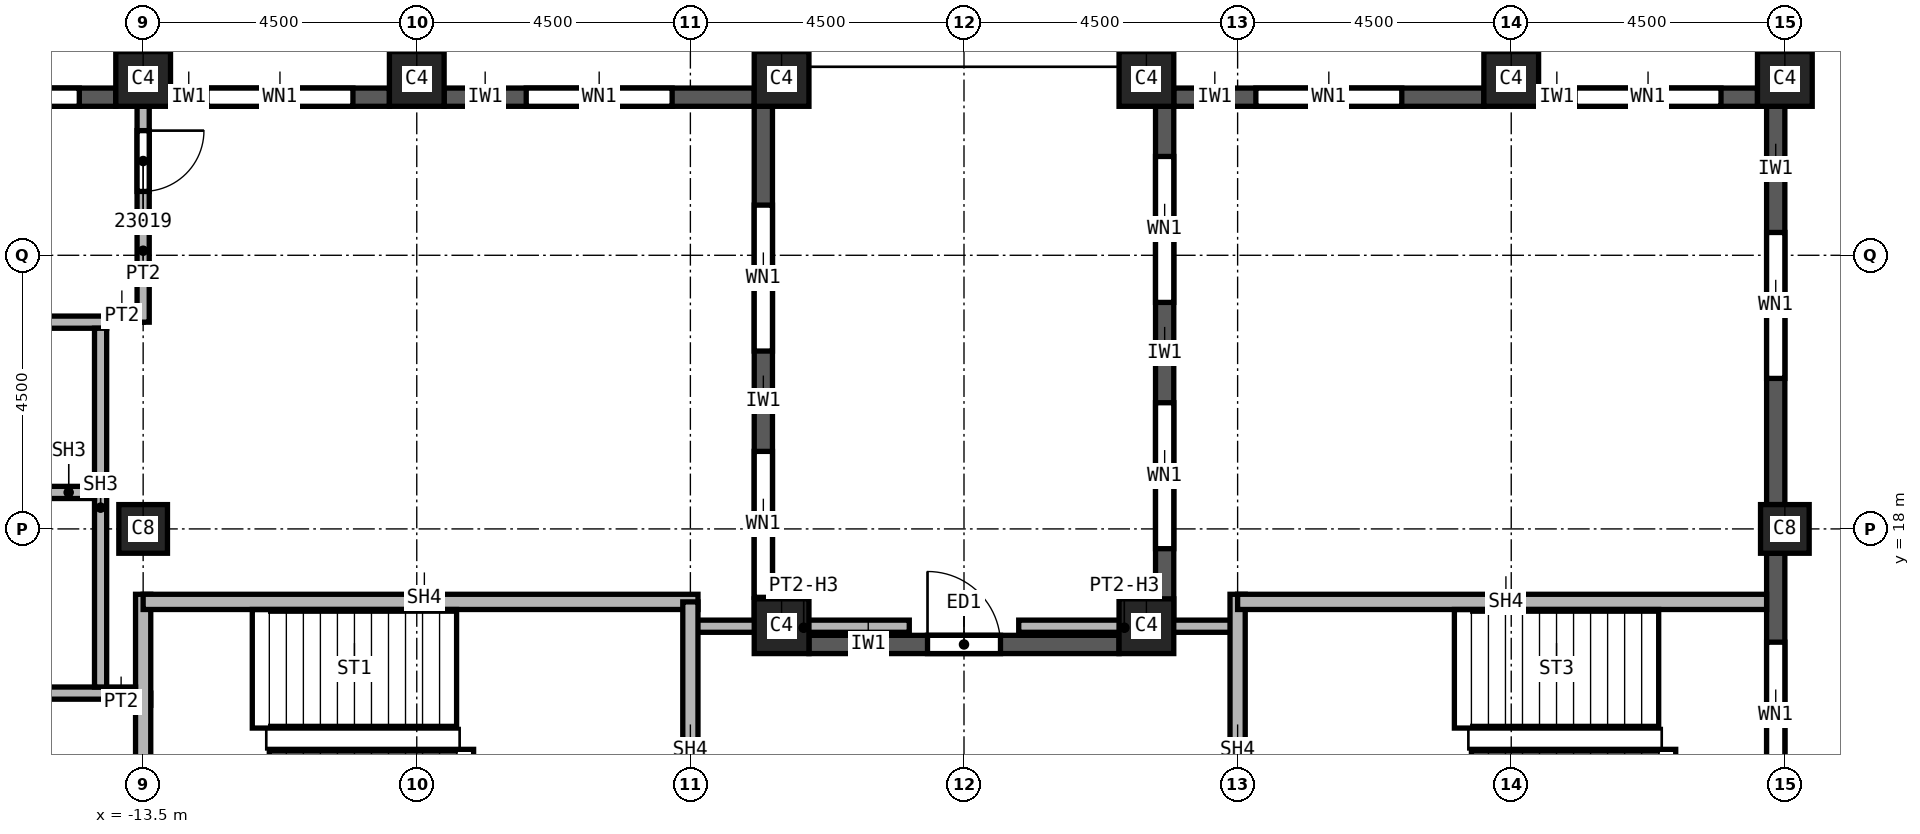
"""IFC4 building model, lengths in metres.
Left out: names, types, materials, properties, quantities, classifications, styles, units other than length and angle.
Written with IfcOpenShell. Run it as: python <this file> out.ifc"""

import sys

from ifc_helpers import new_model, si_unit, direction, frame, frame_2d, origin, origin_2d, place, context, subcontext, project, spatial, rectangle, extrude, element, fill, save


model = new_model("IFC4")
c1 = context("Model", 3, precision=1e-05, world=origin(), true_north=direction((0.0, 1.0)))
c2 = subcontext(c1, "Body", "Model", "MODEL_VIEW")
j1 = project(units=[si_unit("LENGTHUNIT", "METRE"), si_unit("PLANEANGLEUNIT", "RADIAN")], contexts=[c1])
p1 = place(None, origin())
s1 = spatial("IfcSite", under=j1, at=p1, CompositionType="ELEMENT")
p2 = place(p1, origin())
s2 = spatial("IfcBuilding", under=s1, at=p2, CompositionType="ELEMENT")
p3 = place(p2, frame((0.0, 0.0, 326.0)))
s3 = spatial("IfcBuildingStorey", under=s2, at=p3, CompositionType="ELEMENT", Elevation=326.0)
for number, where, z_axis, x_axis in (
    (1, (13.5, 18.0, 0.0), (0.0, 0.0, 1.0), (1.0, 0.0, 0.0)),
    (2, (-13.5, 18.0, 0.0), (0.0, 0.0, 1.0), (1.0, 0.0, 0.0)),
):
    element("IfcColumn", number, at=place(p3, frame(where, z_axis=z_axis, x_axis=x_axis)), inside=s3, PredefinedType="COLUMN", context=c2, shape_type="SweptSolid", body=[
        extrude(rectangle(XDim=0.8, YDim=0.8, at=origin_2d()), origin(), (0.0, 0.0, 1.0), 3.74),
    ])
for number, where, z_axis, x_axis in (
    (3, (3.0, 25.4, 0.0), (0.0, 0.0, 1.0), (1.0, 0.0, 0.0)),
    (4, (9.0, 25.4, 0.0), (0.0, 0.0, 1.0), (1.0, 0.0, 0.0)),
    (5, (13.5, 25.4, 0.0), (0.0, 0.0, 1.0), (1.0, 0.0, 0.0)),
    (6, (-3.0, 25.4, 0.0), (0.0, 0.0, 1.0), (1.0, 0.0, 0.0)),
    (7, (-9.0, 25.4, 0.0), (0.0, 0.0, 1.0), (1.0, 0.0, 0.0)),
    (8, (-13.5, 25.4, 0.0), (0.0, 0.0, 1.0), (1.0, 0.0, 0.0)),
    (9, (3.0, 16.4, 0.0), (0.0, 0.0, 1.0), (1.0, 0.0, 0.0)),
    (10, (-3.0, 16.4, 0.0), (0.0, 0.0, 1.0), (1.0, 0.0, 0.0)),
):
    element("IfcColumn", number, at=place(p3, frame(where, z_axis=z_axis, x_axis=x_axis)), inside=s3, PredefinedType="COLUMN", context=c2, shape_type="SweptSolid", body=[
        extrude(rectangle(XDim=0.9, YDim=0.9, at=origin_2d()), origin(), (0.0, 0.0, 1.0), 3.74),
    ])
p4 = place(p3, frame((13.05, 25.1, 0.0), z_axis=(0.0, 0.0, 1.0), x_axis=(-1.0, 0.0, 0.0)))
e11 = element("IfcWall", 11, at=p4, inside=s3, PredefinedType="SOLIDWALL", context=c2, shape_type="SweptSolid", body=[
    extrude(rectangle(XDim=3.6, YDim=0.3, at=frame_2d((1.8, 0.0))), origin(), (0.0, 0.0, 1.0), 3.14),
])
p5 = place(p4, frame((0.6, 0.0, 0.8)))
e12 = element("IfcOpeningElement", 12, at=p5, cuts=e11, PredefinedType="OPENING", context=c2, shape_type="SweptSolid", body=[
    extrude(rectangle(XDim=2.4, YDim=1.95, at=frame_2d((1.2, 0.975))), frame((0.0, 0.15, 0.0), z_axis=(0.0, -1.0, 0.0), x_axis=(1.0, 0.0, 0.0)), (0.0, 0.0, 1.0), 0.3),
])
p6 = place(p3, frame((8.55, 25.1, 0.0), z_axis=(0.0, 0.0, 1.0), x_axis=(-1.0, 0.0, 0.0)))
e13 = element("IfcWall", 13, at=p6, inside=s3, PredefinedType="SOLIDWALL", context=c2, shape_type="SweptSolid", body=[
    extrude(rectangle(XDim=5.1, YDim=0.3, at=frame_2d((2.55, 0.0))), origin(), (0.0, 0.0, 1.0), 3.14),
])
p7 = place(p6, frame((1.35, 0.0, 0.8)))
e14 = element("IfcOpeningElement", 14, at=p7, cuts=e13, PredefinedType="OPENING", context=c2, shape_type="SweptSolid", body=[
    extrude(rectangle(XDim=2.4, YDim=1.95, at=frame_2d((1.2, 0.975))), frame((0.0, 0.15, 0.0), z_axis=(0.0, -1.0, 0.0), x_axis=(1.0, 0.0, 0.0)), (0.0, 0.0, 1.0), 0.3),
])
p8 = place(p3, frame((3.3, 24.95, 0.0), z_axis=(0.0, 0.0, 1.0), x_axis=(0.0, -1.0, 0.0)))
e15 = element("IfcWall", 15, at=p8, inside=s3, PredefinedType="SOLIDWALL", context=c2, shape_type="SweptSolid", body=[
    extrude(rectangle(XDim=8.5, YDim=0.3, at=frame_2d((4.25, 0.0))), origin(), (0.0, 0.0, 1.0), 3.14),
])
p9 = place(p8, frame((0.825, 0.0, 0.8)))
e16 = element("IfcOpeningElement", 16, at=p9, cuts=e15, PredefinedType="OPENING", context=c2, shape_type="SweptSolid", body=[
    extrude(rectangle(XDim=2.4, YDim=1.95, at=frame_2d((1.2, 0.975))), frame((0.0, 0.15, 0.0), z_axis=(0.0, -1.0, 0.0), x_axis=(1.0, 0.0, 0.0)), (0.0, 0.0, 1.0), 0.3),
])
p10 = place(p8, frame((4.875, 0.0, 0.8)))
e17 = element("IfcOpeningElement", 17, at=p10, cuts=e15, PredefinedType="OPENING", context=c2, shape_type="SweptSolid", body=[
    extrude(rectangle(XDim=2.4, YDim=1.95, at=frame_2d((1.2, 0.975))), frame((0.0, 0.15, 0.0), z_axis=(0.0, -1.0, 0.0), x_axis=(1.0, 0.0, 0.0)), (0.0, 0.0, 1.0), 0.3),
])
p11 = place(p3, frame((-2.55, 16.1, 0.0), z_axis=(0.0, 0.0, 1.0), x_axis=(1.0, 0.0, 0.0)))
e18 = element("IfcWall", 18, at=p11, inside=s3, PredefinedType="SOLIDWALL", context=c2, shape_type="SweptSolid", body=[
    extrude(rectangle(XDim=5.1, YDim=0.3, at=frame_2d((2.55, 0.0))), origin(), (0.0, 0.0, 1.0), 3.14),
])
p12 = place(p11, frame((1.95, 0.0, 0.0)))
e19 = element("IfcOpeningElement", 19, at=p12, cuts=e18, PredefinedType="OPENING", context=c2, shape_type="SweptSolid", body=[
    extrude(rectangle(XDim=1.2, YDim=2.4, at=frame_2d((0.6, 1.2))), frame((0.0, 0.15, 0.0), z_axis=(0.0, -1.0, 0.0), x_axis=(1.0, 0.0, 0.0)), (0.0, 0.0, 1.0), 0.3),
])
p13 = place(p3, frame((-3.3, 16.45, 0.0), z_axis=(0.0, 0.0, 1.0), x_axis=(0.0, 1.0, 0.0)))
e20 = element("IfcWall", 20, at=p13, inside=s3, PredefinedType="SOLIDWALL", context=c2, shape_type="SweptSolid", body=[
    extrude(rectangle(XDim=8.5, YDim=0.3, at=frame_2d((4.25, 0.0))), origin(), (0.0, 0.0, 1.0), 3.14),
])
p14 = place(p13, frame((0.425, 0.0, 0.8)))
e21 = element("IfcOpeningElement", 21, at=p14, cuts=e20, PredefinedType="OPENING", context=c2, shape_type="SweptSolid", body=[
    extrude(rectangle(XDim=2.4, YDim=1.95, at=frame_2d((1.2, 0.975))), frame((0.0, 0.15, 0.0), z_axis=(0.0, -1.0, 0.0), x_axis=(1.0, 0.0, 0.0)), (0.0, 0.0, 1.0), 0.3),
])
p15 = place(p13, frame((4.475, 0.0, 0.8)))
e22 = element("IfcOpeningElement", 22, at=p15, cuts=e20, PredefinedType="OPENING", context=c2, shape_type="SweptSolid", body=[
    extrude(rectangle(XDim=2.4, YDim=1.95, at=frame_2d((1.2, 0.975))), frame((0.0, 0.15, 0.0), z_axis=(0.0, -1.0, 0.0), x_axis=(1.0, 0.0, 0.0)), (0.0, 0.0, 1.0), 0.3),
])
p16 = place(p3, frame((-3.45, 25.1, 0.0), z_axis=(0.0, 0.0, 1.0), x_axis=(-1.0, 0.0, 0.0)))
e23 = element("IfcWall", 23, at=p16, inside=s3, PredefinedType="SOLIDWALL", context=c2, shape_type="SweptSolid", body=[
    extrude(rectangle(XDim=5.1, YDim=0.3, at=frame_2d((2.55, 0.0))), origin(), (0.0, 0.0, 1.0), 3.14),
])
p17 = place(p16, frame((1.35, 0.0, 0.8)))
e24 = element("IfcOpeningElement", 24, at=p17, cuts=e23, PredefinedType="OPENING", context=c2, shape_type="SweptSolid", body=[
    extrude(rectangle(XDim=2.4, YDim=1.95, at=frame_2d((1.2, 0.975))), frame((0.0, 0.15, 0.0), z_axis=(0.0, -1.0, 0.0), x_axis=(1.0, 0.0, 0.0)), (0.0, 0.0, 1.0), 0.3),
])
p18 = place(p3, frame((-9.45, 25.1, 0.0), z_axis=(0.0, 0.0, 1.0), x_axis=(-1.0, 0.0, 0.0)))
e25 = element("IfcWall", 25, at=p18, inside=s3, PredefinedType="SOLIDWALL", context=c2, shape_type="SweptSolid", body=[
    extrude(rectangle(XDim=3.6, YDim=0.3, at=frame_2d((1.8, 0.0))), origin(), (0.0, 0.0, 1.0), 3.14),
])
p19 = place(p18, frame((0.6, 0.0, 0.8)))
e26 = element("IfcOpeningElement", 26, at=p19, cuts=e25, PredefinedType="OPENING", context=c2, shape_type="SweptSolid", body=[
    extrude(rectangle(XDim=2.4, YDim=1.95, at=frame_2d((1.2, 0.975))), frame((0.0, 0.15, 0.0), z_axis=(0.0, -1.0, 0.0), x_axis=(1.0, 0.0, 0.0)), (0.0, 0.0, 1.0), 0.3),
])
p20 = place(p3, frame((-13.95, 25.1, 0.0), z_axis=(0.0, 0.0, 1.0), x_axis=(-1.0, 0.0, 0.0)))
e27 = element("IfcWall", 27, at=p20, inside=s3, PredefinedType="SOLIDWALL", context=c2, shape_type="SweptSolid", body=[
    extrude(rectangle(XDim=3.6, YDim=0.3, at=frame_2d((1.8, 0.0))), origin(), (0.0, 0.0, 1.0), 3.14),
])
p21 = place(p20, frame((0.6, 0.0, 0.8)))
e28 = element("IfcOpeningElement", 28, at=p21, cuts=e27, PredefinedType="OPENING", context=c2, shape_type="SweptSolid", body=[
    extrude(rectangle(XDim=2.4, YDim=1.95, at=frame_2d((1.2, 0.975))), frame((0.0, 0.15, 0.0), z_axis=(0.0, -1.0, 0.0), x_axis=(1.0, 0.0, 0.0)), (0.0, 0.0, 1.0), 0.3),
])
p22 = place(p3, frame((13.35, 9.05, 0.0), z_axis=(0.0, 0.0, 1.0), x_axis=(0.0, 1.0, 0.0)))
e29 = element("IfcWall", 29, at=p22, inside=s3, PredefinedType="SOLIDWALL", context=c2, shape_type="SweptSolid", body=[
    extrude(rectangle(XDim=8.55, YDim=0.3, at=frame_2d((4.275, 0.0))), origin(), (0.0, 0.0, 1.0), 3.14),
])
p23 = place(p22, frame((0.562, 0.0, 0.8)))
e30 = element("IfcOpeningElement", 30, at=p23, cuts=e29, PredefinedType="OPENING", context=c2, shape_type="SweptSolid", body=[
    extrude(rectangle(XDim=2.4, YDim=1.95, at=frame_2d((1.2, 0.975))), frame((0.0, 0.15, 0.0), z_axis=(0.0, -1.0, 0.0), x_axis=(1.0, 0.0, 0.0)), (0.0, 0.0, 1.0), 0.3),
])
p24 = place(p22, frame((4.688, 0.0, 0.8)))
e31 = element("IfcOpeningElement", 31, at=p24, cuts=e29, PredefinedType="OPENING", context=c2, shape_type="SweptSolid", body=[
    extrude(rectangle(XDim=2.4, YDim=1.95, at=frame_2d((1.2, 0.975))), frame((0.0, 0.15, 0.0), z_axis=(0.0, -1.0, 0.0), x_axis=(1.0, 0.0, 0.0)), (0.0, 0.0, 1.0), 0.3),
])
p25 = place(p3, frame((13.35, 18.4, 0.0), z_axis=(0.0, 0.0, 1.0), x_axis=(0.0, 1.0, 0.0)))
e32 = element("IfcWall", 32, at=p25, inside=s3, PredefinedType="SOLIDWALL", context=c2, shape_type="SweptSolid", body=[
    extrude(rectangle(XDim=6.55, YDim=0.3, at=frame_2d((3.275, 0.0))), origin(), (0.0, 0.0, 1.0), 3.14),
])
p26 = place(p25, frame((2.075, 0.0, 0.8)))
e33 = element("IfcOpeningElement", 33, at=p26, cuts=e32, PredefinedType="OPENING", context=c2, shape_type="SweptSolid", body=[
    extrude(rectangle(XDim=2.4, YDim=1.95, at=frame_2d((1.2, 0.975))), frame((0.0, 0.15, 0.0), z_axis=(0.0, -1.0, 0.0), x_axis=(1.0, 0.0, 0.0)), (0.0, 0.0, 1.0), 0.3),
])
p27 = place(p3, frame((-14.1, 15.2, 0.0), z_axis=(0.0, 0.0, 1.0), x_axis=(1.0, 0.0, 0.0)))
e34 = element("IfcWall", 34, at=p27, inside=s3, PredefinedType="PARTITIONING", context=c2, shape_type="SweptSolid", body=[
    extrude(rectangle(XDim=0.725, YDim=0.2, at=frame_2d((0.363, 0.0))), origin(), (0.0, 0.0, 1.0), 3.74),
])
p28 = place(p3, frame((-13.5, 21.5, 0.0), z_axis=(0.0, 0.0, 1.0), x_axis=(-1.0, 0.0, 0.0)))
e35 = element("IfcWall", 35, at=p28, inside=s3, PredefinedType="PARTITIONING", context=c2, shape_type="SweptSolid", body=[
    extrude(rectangle(XDim=0.6, YDim=0.2, at=frame_2d((0.3, 0.0))), origin(), (0.0, 0.0, 1.0), 3.74),
])
p29 = place(p3, frame((-13.5, 24.95, 0.0), z_axis=(0.0, 0.0, 1.0), x_axis=(0.0, -1.0, 0.0)))
e36 = element("IfcWall", 36, at=p29, inside=s3, PredefinedType="PARTITIONING", context=c2, shape_type="SweptSolid", body=[
    extrude(rectangle(XDim=3.55, YDim=0.2, at=frame_2d((1.775, 0.0))), origin(), (0.0, 0.0, 1.0), 3.74),
])
p30 = place(p29, frame((0.4, 0.0, 0.0)))
e37 = element("IfcOpeningElement", 37, at=p30, cuts=e36, PredefinedType="OPENING", context=c2, shape_type="SweptSolid", body=[
    extrude(rectangle(XDim=1.0, YDim=2.1, at=frame_2d((0.5, 1.05))), frame((0.0, 0.1, 0.0), z_axis=(0.0, -1.0, 0.0), x_axis=(1.0, 0.0, 0.0)), (0.0, 0.0, 1.0), 0.2),
])
for number, where, z_axis, x_axis in (
    (38, (-4.5, 16.4, 0.0), (0.0, 0.0, 1.0), (1.0, 0.0, 0.0)),
    (39, (0.9, 16.4, 0.0), (0.0, 0.0, 1.0), (1.0, 0.0, 0.0)),
):
    element("IfcWall", number, at=place(p3, frame(where, z_axis=z_axis, x_axis=x_axis)), inside=s3, PredefinedType="PARTITIONING", context=c2, shape_type="SweptSolid", body=[
        extrude(rectangle(XDim=3.6, YDim=0.2, at=frame_2d((1.8, 0.0))), origin(), (0.0, 0.0, 1.0), 3.204),
    ])
p31 = place(p3, frame((-13.5, 12.175, 0.0), z_axis=(0.0, 0.0, 1.0), x_axis=(0.0, 1.0, 0.0)))
e40 = element("IfcWall", 40, at=p31, inside=s3, PredefinedType="SOLIDWALL", context=c2, shape_type="SweptSolid", body=[
    extrude(rectangle(XDim=4.75, YDim=0.25, at=frame_2d((2.375, 0.0))), origin(), (0.0, 0.0, 1.0), 3.74),
])
p32 = place(p3, frame((-13.5, 16.8, 0.0), z_axis=(0.0, 0.0, 1.0), x_axis=(1.0, 0.0, 0.0)))
e41 = element("IfcWall", 41, at=p32, inside=s3, PredefinedType="SOLIDWALL", context=c2, shape_type="SweptSolid", body=[
    extrude(rectangle(XDim=9.125, YDim=0.25, at=frame_2d((4.562, 0.0))), origin(), (0.0, 0.0, 1.0), 3.74),
])
p33 = place(p3, frame((-4.5, 16.8, 0.0), z_axis=(0.0, 0.0, 1.0), x_axis=(0.0, -1.0, 0.0)))
e42 = element("IfcWall", 42, at=p33, inside=s3, PredefinedType="SOLIDWALL", context=c2, shape_type="SweptSolid", body=[
    extrude(rectangle(XDim=4.5, YDim=0.25, at=frame_2d((2.25, 0.0))), origin(), (0.0, 0.0, 1.0), 3.74),
])
p34 = place(p3, frame((4.5, 12.3, 0.0), z_axis=(0.0, 0.0, 1.0), x_axis=(0.0, 1.0, 0.0)))
e43 = element("IfcWall", 43, at=p34, inside=s3, PredefinedType="SOLIDWALL", context=c2, shape_type="SweptSolid", body=[
    extrude(rectangle(XDim=4.625, YDim=0.25, at=frame_2d((2.312, 0.0))), origin(), (0.0, 0.0, 1.0), 3.74),
])
p35 = place(p3, frame((4.5, 16.8, 0.0), z_axis=(0.0, 0.0, 1.0), x_axis=(1.0, 0.0, 0.0)))
e44 = element("IfcWall", 44, at=p35, inside=s3, PredefinedType="SOLIDWALL", context=c2, shape_type="SweptSolid", body=[
    extrude(rectangle(XDim=8.7, YDim=0.25, at=frame_2d((4.35, 0.0))), origin(), (0.0, 0.0, 1.0), 3.74),
])
p36 = place(p3, frame((-21.9, 15.3, 0.0), z_axis=(0.0, 0.0, 1.0), x_axis=(1.0, 0.0, 0.0)))
e45 = element("IfcWall", 45, at=p36, inside=s3, PredefinedType="SOLIDWALL", context=c2, shape_type="SweptSolid", body=[
    extrude(rectangle(XDim=8.275, YDim=0.2, at=frame_2d((4.137, 0.0))), origin(), (0.0, 0.0, 1.0), 3.74),
])
p37 = place(p36, frame((4.8, 0.0, 0.0)))
e46 = element("IfcOpeningElement", 46, at=p37, cuts=e45, PredefinedType="OPENING", context=c2, shape_type="SweptSolid", body=[
    extrude(rectangle(XDim=1.2, YDim=2.1, at=frame_2d((0.6, 1.05))), frame((0.0, 0.1, 0.0), z_axis=(0.0, -1.0, 0.0), x_axis=(1.0, 0.0, 0.0)), (0.0, 0.0, 1.0), 0.2),
])
p38 = place(p3, frame((-21.9, 21.4, 0.0), z_axis=(0.0, 0.0, 1.0), x_axis=(1.0, 0.0, 0.0)))
e47 = element("IfcWall", 47, at=p38, inside=s3, PredefinedType="SOLIDWALL", context=c2, shape_type="SweptSolid", body=[
    extrude(rectangle(XDim=7.8, YDim=0.2, at=frame_2d((3.9, 0.0))), origin(), (0.0, 0.0, 1.0), 3.74),
])
p39 = place(p38, frame((3.2, 0.0, 0.0)))
e48 = element("IfcOpeningElement", 48, at=p39, cuts=e47, PredefinedType="OPENING", context=c2, shape_type="SweptSolid", body=[
    extrude(rectangle(XDim=1.2, YDim=2.1, at=frame_2d((0.6, 1.05))), frame((0.0, 0.1, 0.0), z_axis=(0.0, -1.0, 0.0), x_axis=(1.0, 0.0, 0.0)), (0.0, 0.0, 1.0), 0.2),
])
p40 = place(p3, frame((-14.2, 15.4, 0.0), z_axis=(0.0, 0.0, 1.0), x_axis=(0.0, 1.0, 0.0)))
e49 = element("IfcWall", 49, at=p40, inside=s3, PredefinedType="SOLIDWALL", context=c2, shape_type="SweptSolid", body=[
    extrude(rectangle(XDim=5.9, YDim=0.2, at=frame_2d((2.95, 0.0))), origin(), (0.0, 0.0, 1.0), 3.74),
])
p41 = place(p3, frame((-17.1, 18.6, 0.0), z_axis=(0.0, 0.0, 1.0), x_axis=(1.0, 0.0, 0.0)))
e50 = element("IfcWall", 50, at=p41, inside=s3, PredefinedType="SOLIDWALL", context=c2, shape_type="SweptSolid", body=[
    extrude(rectangle(XDim=2.8, YDim=0.2, at=frame_2d((1.4, 0.0))), origin(), (0.0, 0.0, 1.0), 3.74),
])
p42 = place(p41, frame((0.85, 0.0, 0.0)))
e51 = element("IfcOpeningElement", 51, at=p42, cuts=e50, PredefinedType="OPENING", context=c2, shape_type="SweptSolid", body=[
    extrude(rectangle(XDim=1.1, YDim=2.1, at=frame_2d((0.55, 1.05))), frame((0.0, 0.1, 0.0), z_axis=(0.0, -1.0, 0.0), x_axis=(1.0, 0.0, 0.0)), (0.0, 0.0, 1.0), 0.2),
])
p43 = place(p5, origin())
e52 = element("IfcWindow", 52, at=p43, inside=s3, PartitioningType="SINGLE_PANEL", PredefinedType="WINDOW", context=c2, shape_type="SweptSolid", body=[
    extrude(rectangle(XDim=2.4, YDim=1.95, at=frame_2d((1.2, 0.975))), frame((0.0, 0.03, 0.0), z_axis=(0.0, -1.0, 0.0), x_axis=(1.0, 0.0, 0.0)), (0.0, 0.0, 1.0), 0.06),
])
fill(e12, e52)
p44 = place(p7, origin())
e53 = element("IfcWindow", 53, at=p44, inside=s3, PartitioningType="SINGLE_PANEL", PredefinedType="WINDOW", context=c2, shape_type="SweptSolid", body=[
    extrude(rectangle(XDim=2.4, YDim=1.95, at=frame_2d((1.2, 0.975))), frame((0.0, 0.03, 0.0), z_axis=(0.0, -1.0, 0.0), x_axis=(1.0, 0.0, 0.0)), (0.0, 0.0, 1.0), 0.06),
])
fill(e14, e53)
p45 = place(p9, origin())
e54 = element("IfcWindow", 54, at=p45, inside=s3, PartitioningType="SINGLE_PANEL", PredefinedType="WINDOW", context=c2, shape_type="SweptSolid", body=[
    extrude(rectangle(XDim=2.4, YDim=1.95, at=frame_2d((1.2, 0.975))), frame((0.0, 0.03, 0.0), z_axis=(0.0, -1.0, 0.0), x_axis=(1.0, 0.0, 0.0)), (0.0, 0.0, 1.0), 0.06),
])
fill(e16, e54)
p46 = place(p10, origin())
e55 = element("IfcWindow", 55, at=p46, inside=s3, PartitioningType="SINGLE_PANEL", PredefinedType="WINDOW", context=c2, shape_type="SweptSolid", body=[
    extrude(rectangle(XDim=2.4, YDim=1.95, at=frame_2d((1.2, 0.975))), frame((0.0, 0.03, 0.0), z_axis=(0.0, -1.0, 0.0), x_axis=(1.0, 0.0, 0.0)), (0.0, 0.0, 1.0), 0.06),
])
fill(e17, e55)
p47 = place(p12, origin())
e56 = element("IfcDoor", 56, at=p47, inside=s3, OperationType="SINGLE_SWING_LEFT", PredefinedType="DOOR", context=c2, shape_type="SweptSolid", body=[
    extrude(rectangle(XDim=1.2, YDim=2.4, at=frame_2d((0.6, 1.2))), frame((0.0, 0.025, 0.0), z_axis=(0.0, -1.0, 0.0), x_axis=(1.0, 0.0, 0.0)), (0.0, 0.0, 1.0), 0.05),
])
fill(e19, e56)
p48 = place(p14, origin())
e57 = element("IfcWindow", 57, at=p48, inside=s3, PartitioningType="SINGLE_PANEL", PredefinedType="WINDOW", context=c2, shape_type="SweptSolid", body=[
    extrude(rectangle(XDim=2.4, YDim=1.95, at=frame_2d((1.2, 0.975))), frame((0.0, 0.03, 0.0), z_axis=(0.0, -1.0, 0.0), x_axis=(1.0, 0.0, 0.0)), (0.0, 0.0, 1.0), 0.06),
])
fill(e21, e57)
p49 = place(p15, origin())
e58 = element("IfcWindow", 58, at=p49, inside=s3, PartitioningType="SINGLE_PANEL", PredefinedType="WINDOW", context=c2, shape_type="SweptSolid", body=[
    extrude(rectangle(XDim=2.4, YDim=1.95, at=frame_2d((1.2, 0.975))), frame((0.0, 0.03, 0.0), z_axis=(0.0, -1.0, 0.0), x_axis=(1.0, 0.0, 0.0)), (0.0, 0.0, 1.0), 0.06),
])
fill(e22, e58)
p50 = place(p17, origin())
e59 = element("IfcWindow", 59, at=p50, inside=s3, PartitioningType="SINGLE_PANEL", PredefinedType="WINDOW", context=c2, shape_type="SweptSolid", body=[
    extrude(rectangle(XDim=2.4, YDim=1.95, at=frame_2d((1.2, 0.975))), frame((0.0, 0.03, 0.0), z_axis=(0.0, -1.0, 0.0), x_axis=(1.0, 0.0, 0.0)), (0.0, 0.0, 1.0), 0.06),
])
fill(e24, e59)
p51 = place(p19, origin())
e60 = element("IfcWindow", 60, at=p51, inside=s3, PartitioningType="SINGLE_PANEL", PredefinedType="WINDOW", context=c2, shape_type="SweptSolid", body=[
    extrude(rectangle(XDim=2.4, YDim=1.95, at=frame_2d((1.2, 0.975))), frame((0.0, 0.03, 0.0), z_axis=(0.0, -1.0, 0.0), x_axis=(1.0, 0.0, 0.0)), (0.0, 0.0, 1.0), 0.06),
])
fill(e26, e60)
p52 = place(p21, origin())
e61 = element("IfcWindow", 61, at=p52, inside=s3, PartitioningType="SINGLE_PANEL", PredefinedType="WINDOW", context=c2, shape_type="SweptSolid", body=[
    extrude(rectangle(XDim=2.4, YDim=1.95, at=frame_2d((1.2, 0.975))), frame((0.0, 0.03, 0.0), z_axis=(0.0, -1.0, 0.0), x_axis=(1.0, 0.0, 0.0)), (0.0, 0.0, 1.0), 0.06),
])
fill(e28, e61)
p53 = place(p24, origin())
e62 = element("IfcWindow", 62, at=p53, inside=s3, PartitioningType="SINGLE_PANEL", PredefinedType="WINDOW", context=c2, shape_type="SweptSolid", body=[
    extrude(rectangle(XDim=2.4, YDim=1.95, at=frame_2d((1.2, 0.975))), frame((0.0, 0.03, 0.0), z_axis=(0.0, -1.0, 0.0), x_axis=(1.0, 0.0, 0.0)), (0.0, 0.0, 1.0), 0.06),
])
fill(e31, e62)
p54 = place(p26, origin())
e63 = element("IfcWindow", 63, at=p54, inside=s3, PartitioningType="SINGLE_PANEL", PredefinedType="WINDOW", context=c2, shape_type="SweptSolid", body=[
    extrude(rectangle(XDim=2.4, YDim=1.95, at=frame_2d((1.2, 0.975))), frame((0.0, 0.03, 0.0), z_axis=(0.0, -1.0, 0.0), x_axis=(1.0, 0.0, 0.0)), (0.0, 0.0, 1.0), 0.06),
])
fill(e33, e63)
p55 = place(p30, origin())
e64 = element("IfcDoor", 64, at=p55, inside=s3, OperationType="SINGLE_SWING_RIGHT", PredefinedType="DOOR", context=c2, shape_type="SweptSolid", body=[
    extrude(rectangle(XDim=1.0, YDim=2.1, at=frame_2d((0.5, 1.05))), frame((0.0, 0.025, 0.0), z_axis=(0.0, -1.0, 0.0), x_axis=(1.0, 0.0, 0.0)), (0.0, 0.0, 1.0), 0.05),
])
fill(e37, e64)
save(model, sys.argv[1])
